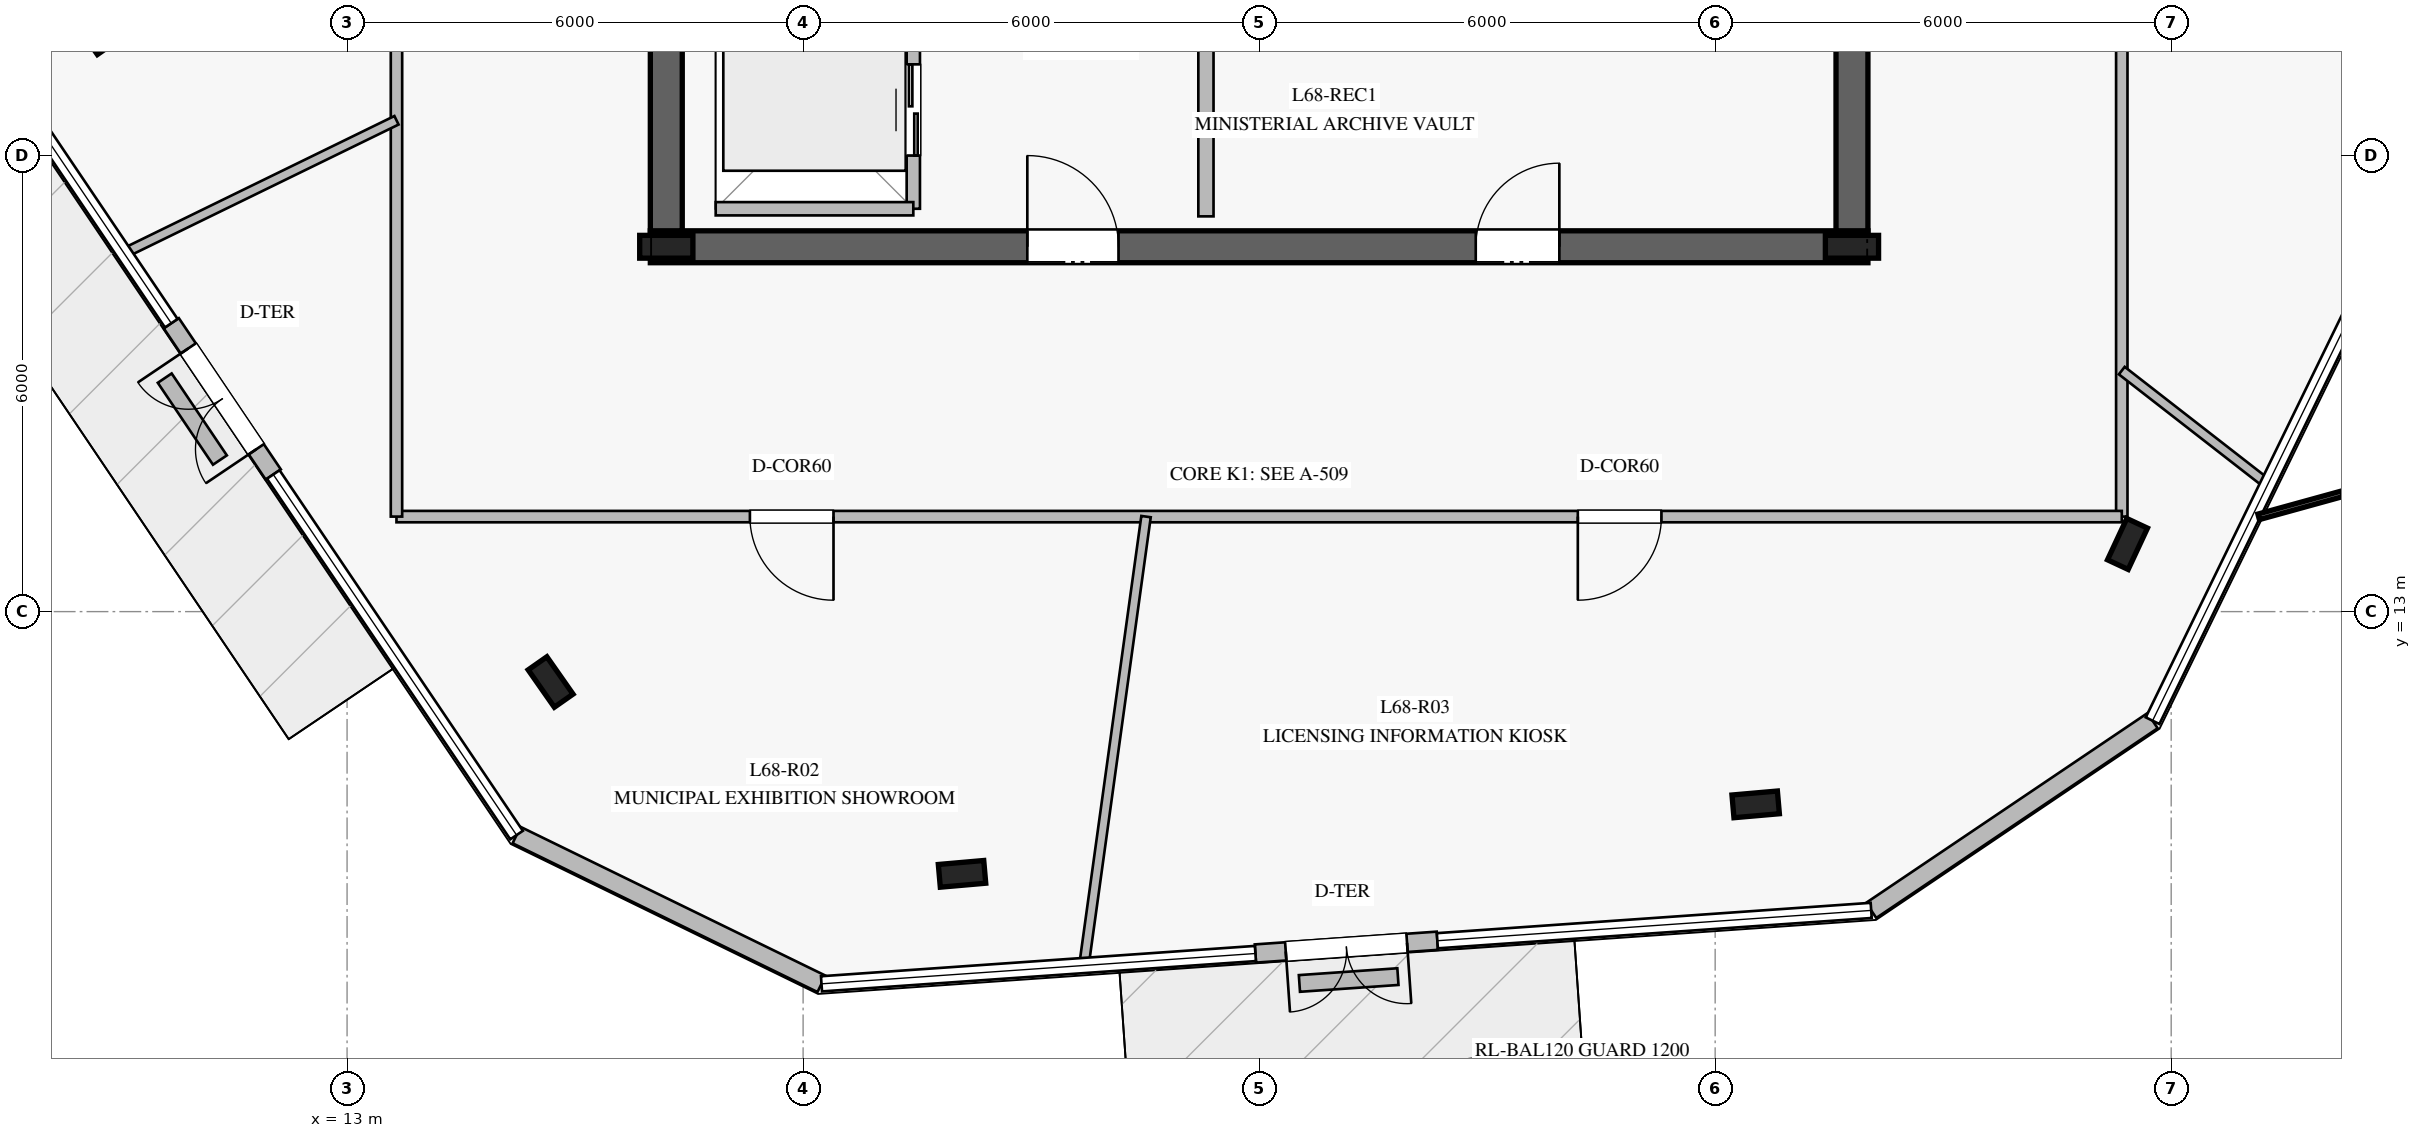
"""IFC4 building model, lengths in metres.
Left out: names, types, materials, properties, quantities, classifications, styles, units other than length and angle.
Written with IfcOpenShell. Run it as: python <this file> out.ifc"""

import sys

from ifc_helpers import new_model, si_unit, direction, frame, frame_2d, origin, origin_2d, place, context, subcontext, project, spatial, rectangle, i_section, extrude, element, fill, save


model = new_model("IFC4")
c1 = context("Model", 3, precision=1e-05, world=origin(), true_north=direction((0.0, 1.0)))
c2 = subcontext(c1, "Body", "Model", "MODEL_VIEW")
j1 = project(units=[si_unit("LENGTHUNIT", "METRE"), si_unit("PLANEANGLEUNIT", "RADIAN")], contexts=[c1])
p1 = place(None, origin())
s1 = spatial("IfcSite", under=j1, at=p1, CompositionType="ELEMENT")
p2 = place(p1, origin())
s2 = spatial("IfcBuilding", under=s1, at=p2, CompositionType="ELEMENT")
p3 = place(p2, frame((0.0, 0.0, 282.2)))
s3 = spatial("IfcBuildingStorey", under=s2, at=p3, CompositionType="ELEMENT", Elevation=282.2)
p4 = place(p3, frame((16.99, 17.8, 0.0), z_axis=(0.0, 0.0, 1.0), x_axis=(1.0, 0.0, 0.0)))
e1 = element("IfcWall", 1, at=p4, inside=s3, PredefinedType="SHEAR", context=c2, shape_type="SweptSolid", body=[
    extrude(rectangle(XDim=16.02, YDim=0.42, at=frame_2d((8.01, 0.0))), origin(), (0.0, 0.0, 1.0), 3.78),
])
p5 = place(p4, frame((4.96, 0.0, 0.0)))
e2 = element("IfcOpeningElement", 2, at=p5, cuts=e1, PredefinedType="OPENING", context=c2, shape_type="SweptSolid", body=[
    extrude(rectangle(XDim=1.2, YDim=2.25, at=frame_2d((0.6, 1.125))), frame((0.0, 0.22, 0.0), z_axis=(0.0, -1.0, 0.0), x_axis=(1.0, 0.0, 0.0)), (0.0, 0.0, 1.0), 0.44),
])
p6 = place(p4, frame((10.86, 0.0, 0.0)))
e3 = element("IfcOpeningElement", 3, at=p6, cuts=e1, PredefinedType="OPENING", context=c2, shape_type="SweptSolid", body=[
    extrude(rectangle(XDim=1.1, YDim=2.2, at=frame_2d((0.55, 1.1))), frame((0.0, 0.22, 0.0), z_axis=(0.0, -1.0, 0.0), x_axis=(1.0, 0.0, 0.0)), (0.0, 0.0, 1.0), 0.44),
])
p7 = place(p3, frame((17.2, 31.99, 0.0), z_axis=(0.0, 0.0, 1.0), x_axis=(0.0, -1.0, 0.0)))
e4 = element("IfcWall", 4, at=p7, inside=s3, PredefinedType="SHEAR", context=c2, shape_type="SweptSolid", body=[
    extrude(rectangle(XDim=13.98, YDim=0.42, at=frame_2d((6.99, 0.0))), origin(), (0.0, 0.0, 1.0), 3.78),
])
p8 = place(p7, frame((2.14, 0.0, 0.0)))
e5 = element("IfcOpeningElement", 5, at=p8, cuts=e4, PredefinedType="OPENING", context=c2, shape_type="SweptSolid", body=[
    extrude(rectangle(XDim=1.5, YDim=2.2, at=frame_2d((0.75, 1.1))), frame((0.0, 0.22, 0.0), z_axis=(0.0, -1.0, 0.0), x_axis=(1.0, 0.0, 0.0)), (0.0, 0.0, 1.0), 0.44),
])
p9 = place(p3, frame((32.8, 18.01, 0.0), z_axis=(0.0, 0.0, 1.0), x_axis=(0.0, 1.0, 0.0)))
e6 = element("IfcWall", 6, at=p9, inside=s3, PredefinedType="SHEAR", context=c2, shape_type="SweptSolid", body=[
    extrude(rectangle(XDim=13.98, YDim=0.42, at=frame_2d((6.99, 0.0))), origin(), (0.0, 0.0, 1.0), 3.78),
])
for number, where, z_axis, x_axis in (
    (7, (17.2, 17.8, 0.0), (0.0, 0.0, 1.0), (1.0, 0.0, 0.0)),
    (8, (32.8, 17.8, 0.0), (0.0, 0.0, 1.0), (1.0, 0.0, 0.0)),
):
    element("IfcColumn", number, at=place(p3, frame(where, z_axis=z_axis, x_axis=x_axis)), inside=s3, PredefinedType="COLUMN", context=c2, shape_type="SweptSolid", body=[
        extrude(i_section(OverallWidth=0.3, OverallDepth=0.7, WebThickness=0.017, FlangeThickness=0.032, at=origin_2d()), origin(), (0.0, 0.0, 1.0), 4.0),
    ])
for number, where, z_axis, x_axis in (
    (9, (15.678, 12.074, 0.0), (0.0, 0.0, 1.0), (-0.574, 0.819, 0.0)),
    (10, (21.091, 9.55, 0.0), (0.0, 0.0, 1.0), (0.996, 0.087, 0.0)),
    (11, (31.533, 10.464, 0.0), (0.0, 0.0, 1.0), (0.996, 0.087, 0.0)),
    (12, (36.425, 13.89, 0.0), (0.0, 0.0, 1.0), (0.423, 0.906, 0.0)),
):
    element("IfcColumn", number, at=place(p3, frame(where, z_axis=z_axis, x_axis=x_axis)), inside=s3, PredefinedType="COLUMN", context=c2, shape_type="SweptSolid", body=[
        extrude(i_section(OverallWidth=0.3, OverallDepth=0.6, WebThickness=0.015, FlangeThickness=0.03, at=origin_2d()), origin(), (0.0, 0.0, 1.0), 4.0),
    ])
p10 = place(p3, frame((10.687, 16.794, 0.0), z_axis=(0.0, 0.0, 1.0), x_axis=(0.559128660759, -0.82908090119, 0.0)))
e13 = element("IfcWall", 13, at=p10, inside=s3, PredefinedType="STANDARD", context=c2, shape_type="SweptSolid", body=[
    extrude(rectangle(XDim=2.4, YDim=0.24, at=frame_2d((1.2, 0.0))), origin(), (0.0, 0.0, 1.0), 3.78),
])
p11 = place(p10, frame((0.4, 0.0, 0.0)))
e14 = element("IfcOpeningElement", 14, at=p11, cuts=e13, PredefinedType="OPENING", context=c2, shape_type="SweptSolid", body=[
    extrude(rectangle(XDim=1.6, YDim=2.25, at=frame_2d((0.8, 1.125))), frame((0.0, 0.13, 0.0), z_axis=(0.0, -1.0, 0.0), x_axis=(1.0, 0.0, 0.0)), (0.0, 0.0, 1.0), 0.26),
])
p12 = place(p3, frame((15.23, 10.06, 0.0), z_axis=(0.0, 0.0, 1.0), x_axis=(0.898770548201, -0.438419321754, 0.0)))
e15 = element("IfcWall", 15, at=p12, inside=s3, PredefinedType="STANDARD", context=c2, shape_type="SweptSolid", body=[
    extrude(rectangle(XDim=4.464, YDim=0.24, at=frame_2d((2.232, 0.0))), origin(), (0.0, 0.0, 1.0), 3.78),
])
p13 = place(p3, frame((24.951, 8.502, 0.0), z_axis=(0.0, 0.0, 1.0), x_axis=(0.99754775803, 0.069989073784, 0.0)))
e16 = element("IfcWall", 16, at=p13, inside=s3, PredefinedType="STANDARD", context=c2, shape_type="SweptSolid", body=[
    extrude(rectangle(XDim=2.4, YDim=0.24, at=frame_2d((1.2, 0.0))), origin(), (0.0, 0.0, 1.0), 3.78),
])
p14 = place(p13, frame((0.4, 0.0, 0.0)))
e17 = element("IfcOpeningElement", 17, at=p14, cuts=e16, PredefinedType="OPENING", context=c2, shape_type="SweptSolid", body=[
    extrude(rectangle(XDim=1.6, YDim=2.25, at=frame_2d((0.8, 1.125))), frame((0.0, 0.13, 0.0), z_axis=(0.0, -1.0, 0.0), x_axis=(1.0, 0.0, 0.0)), (0.0, 0.0, 1.0), 0.26),
])
p15 = place(p3, frame((33.053, 9.069, 0.0), z_axis=(0.0, 0.0, 1.0), x_axis=(0.829153473241, 0.559021035214, 0.0)))
e18 = element("IfcWall", 18, at=p15, inside=s3, PredefinedType="STANDARD", context=c2, shape_type="SweptSolid", body=[
    extrude(rectangle(XDim=4.465, YDim=0.24, at=frame_2d((2.232, 0.0))), origin(), (0.0, 0.0, 1.0), 3.78),
])
p16 = place(p3, frame((25.53, 8.108, 0.0), z_axis=(0.0, 0.0, 1.0), x_axis=(0.997592367101, 0.069350335995, 0.0)))
e19 = element("IfcWall", 19, at=p16, inside=s3, PredefinedType="USERDEFINED", context=c2, shape_type="SweptSolid", body=[
    extrude(rectangle(XDim=1.299, YDim=0.22, at=frame_2d((0.649, 0.0))), origin(), (0.0, 0.0, 1.0), 0.4),
])
p17 = place(p3, frame((10.601, 16.072, 0.0), z_axis=(0.0, 0.0, 1.0), x_axis=(0.558465865857, -0.829527502059, 0.0)))
e20 = element("IfcWall", 20, at=p17, inside=s3, PredefinedType="USERDEFINED", context=c2, shape_type="SweptSolid", body=[
    extrude(rectangle(XDim=1.3, YDim=0.22, at=frame_2d((0.65, 0.0))), origin(), (0.0, 0.0, 1.0), 0.4),
])
p18 = place(p3, frame((24.3, 18.2, 0.0), z_axis=(0.0, 0.0, 1.0), x_axis=(0.0, 1.0, 0.0)))
e21 = element("IfcWall", 21, at=p18, inside=s3, PredefinedType="PARTITIONING", context=c2, shape_type="SweptSolid", body=[
    extrude(rectangle(XDim=5.15, YDim=0.2, at=frame_2d((2.575, 0.0))), origin(), (0.0, 0.0, 1.0), 3.78),
])
p19 = place(p3, frame((20.45, 18.3, 0.0), z_axis=(0.0, 0.0, 1.0), x_axis=(0.0, 1.0, 0.0)))
e22 = element("IfcWall", 22, at=p19, inside=s3, PredefinedType="PARTITIONING", context=c2, shape_type="SweptSolid", body=[
    extrude(rectangle(XDim=2.6, YDim=0.175, at=frame_2d((1.3, 0.0))), origin(), (0.0, 0.0, 1.0), 3.78),
])
p20 = place(p19, frame((0.7, 0.0, 0.0)))
e23 = element("IfcOpeningElement", 23, at=p20, cuts=e22, PredefinedType="OPENING", context=c2, shape_type="SweptSolid", body=[
    extrude(rectangle(XDim=1.2, YDim=2.2, at=frame_2d((0.6, 1.1))), frame((0.0, 0.098, 0.0), z_axis=(0.0, -1.0, 0.0), x_axis=(1.0, 0.0, 0.0)), (0.0, 0.0, 1.0), 0.195),
])
p21 = place(p3, frame((17.85, 18.3, 0.0), z_axis=(0.0, 0.0, 1.0), x_axis=(1.0, 0.0, 0.0)))
e24 = element("IfcWall", 24, at=p21, inside=s3, PredefinedType="PARTITIONING", context=c2, shape_type="SweptSolid", body=[
    extrude(rectangle(XDim=2.6, YDim=0.175, at=frame_2d((1.3, 0.0))), origin(), (0.0, 0.0, 1.0), 3.78),
])
p22 = place(p3, frame((36.35, 35.75, 0.0), z_axis=(0.0, 0.0, 1.0), x_axis=(0.0, -1.0, 0.0)))
e25 = element("IfcWall", 25, at=p22, inside=s3, PredefinedType="PARTITIONING", context=c2, shape_type="SweptSolid", body=[
    extrude(rectangle(XDim=21.5, YDim=0.15, at=frame_2d((10.75, 0.0))), origin(), (0.0, 0.0, 1.0), 3.05),
])
p23 = place(p22, frame((13.43, 0.0, 0.0)))
e26 = element("IfcOpeningElement", 26, at=p23, cuts=e25, PredefinedType="OPENING", context=c2, shape_type="SweptSolid", body=[
    extrude(rectangle(XDim=1.1, YDim=2.2, at=frame_2d((0.55, 1.1))), frame((0.0, 0.085, 0.0), z_axis=(0.0, -1.0, 0.0), x_axis=(1.0, 0.0, 0.0)), (0.0, 0.0, 1.0), 0.17),
])
p24 = place(p3, frame((36.35, 14.25, 0.0), z_axis=(0.0, 0.0, 1.0), x_axis=(-1.0, 0.0, 0.0)))
e27 = element("IfcWall", 27, at=p24, inside=s3, PredefinedType="PARTITIONING", context=c2, shape_type="SweptSolid", body=[
    extrude(rectangle(XDim=22.7, YDim=0.15, at=frame_2d((11.35, 0.0))), origin(), (0.0, 0.0, 1.0), 3.28),
])
p25 = place(p24, frame((16.95, 0.0, 0.0)))
e28 = element("IfcOpeningElement", 28, at=p25, cuts=e27, PredefinedType="OPENING", context=c2, shape_type="SweptSolid", body=[
    extrude(rectangle(XDim=1.1, YDim=2.2, at=frame_2d((0.55, 1.1))), frame((0.0, 0.085, 0.0), z_axis=(0.0, -1.0, 0.0), x_axis=(1.0, 0.0, 0.0)), (0.0, 0.0, 1.0), 0.17),
])
p26 = place(p24, frame((6.057, 0.0, 0.0)))
e29 = element("IfcOpeningElement", 29, at=p26, cuts=e27, PredefinedType="OPENING", context=c2, shape_type="SweptSolid", body=[
    extrude(rectangle(XDim=1.1, YDim=2.2, at=frame_2d((0.55, 1.1))), frame((0.0, 0.085, 0.0), z_axis=(0.0, -1.0, 0.0), x_axis=(1.0, 0.0, 0.0)), (0.0, 0.0, 1.0), 0.17),
])
p27 = place(p3, frame((13.65, 14.25, 0.0), z_axis=(0.0, 0.0, 1.0), x_axis=(0.0, 1.0, 0.0)))
e30 = element("IfcWall", 30, at=p27, inside=s3, PredefinedType="PARTITIONING", context=c2, shape_type="SweptSolid", body=[
    extrude(rectangle(XDim=21.5, YDim=0.15, at=frame_2d((10.75, 0.0))), origin(), (0.0, 0.0, 1.0), 3.05),
])
p28 = place(p27, frame((10.111, 0.0, 0.0)))
e31 = element("IfcOpeningElement", 31, at=p28, cuts=e30, PredefinedType="OPENING", context=c2, shape_type="SweptSolid", body=[
    extrude(rectangle(XDim=1.1, YDim=2.2, at=frame_2d((0.55, 1.1))), frame((0.0, 0.085, 0.0), z_axis=(0.0, -1.0, 0.0), x_axis=(1.0, 0.0, 0.0)), (0.0, 0.0, 1.0), 0.17),
])
p29 = place(p3, frame((13.65, 19.464, 0.0), z_axis=(0.0, 0.0, 1.0), x_axis=(-0.898688096622, -0.438588309226, 0.0)))
e32 = element("IfcWall", 32, at=p29, inside=s3, PredefinedType="PARTITIONING", context=c2, shape_type="SweptSolid", body=[
    extrude(rectangle(XDim=3.972, YDim=0.125, at=frame_2d((1.986, 0.0))), origin(), (0.0, 0.0, 1.0), 3.28),
])
p30 = place(p3, frame((23.512, 14.25, 0.0), z_axis=(0.0, 0.0, 1.0), x_axis=(-0.137056988253, -0.990563164049, 0.0)))
e33 = element("IfcWall", 33, at=p30, inside=s3, PredefinedType="PARTITIONING", context=c2, shape_type="SweptSolid", body=[
    extrude(rectangle(XDim=5.946, YDim=0.125, at=frame_2d((2.973, 0.0))), origin(), (0.0, 0.0, 1.0), 3.28),
])
p31 = place(p3, frame((36.35, 16.171, 0.0), z_axis=(0.0, 0.0, 1.0), x_axis=(0.78932503786, -0.613975557011, 0.0)))
e34 = element("IfcWall", 34, at=p31, inside=s3, PredefinedType="PARTITIONING", context=c2, shape_type="SweptSolid", body=[
    extrude(rectangle(XDim=2.418, YDim=0.125, at=frame_2d((1.209, 0.0))), origin(), (0.0, 0.0, 1.0), 3.28),
])
p32 = place(p11, frame((1.6, 0.0, 0.0), z_axis=(0.0, 0.0, 1.0), x_axis=(-1.0, 0.0, 0.0)))
e35 = element("IfcDoor", 35, at=p32, inside=s3, OperationType="DOUBLE_DOOR_SINGLE_SWING", PredefinedType="DOOR", context=c2, shape_type="SweptSolid", body=[
    extrude(rectangle(XDim=1.6, YDim=2.25, at=frame_2d((0.8, 1.125))), frame((0.0, 0.025, 0.0), z_axis=(0.0, -1.0, 0.0), x_axis=(1.0, 0.0, 0.0)), (0.0, 0.0, 1.0), 0.05),
])
fill(e14, e35)
p33 = place(p14, frame((1.6, 0.0, 0.0), z_axis=(0.0, 0.0, 1.0), x_axis=(-1.0, 0.0, 0.0)))
e36 = element("IfcDoor", 36, at=p33, inside=s3, OperationType="DOUBLE_DOOR_SINGLE_SWING", PredefinedType="DOOR", context=c2, shape_type="SweptSolid", body=[
    extrude(rectangle(XDim=1.6, YDim=2.25, at=frame_2d((0.8, 1.125))), frame((0.0, 0.025, 0.0), z_axis=(0.0, -1.0, 0.0), x_axis=(1.0, 0.0, 0.0)), (0.0, 0.0, 1.0), 0.05),
])
fill(e17, e36)
p34 = place(p5, origin())
e37 = element("IfcDoor", 37, at=p34, inside=s3, OperationType="SINGLE_SWING_LEFT", PredefinedType="DOOR", context=c2, shape_type="SweptSolid", body=[
    extrude(rectangle(XDim=1.2, YDim=2.25, at=frame_2d((0.6, 1.125))), frame((0.0, 0.025, 0.0), z_axis=(0.0, -1.0, 0.0), x_axis=(1.0, 0.0, 0.0)), (0.0, 0.0, 1.0), 0.05),
])
fill(e2, e37)
p35 = place(p6, origin())
e38 = element("IfcDoor", 38, at=p35, inside=s3, OperationType="SINGLE_SWING_RIGHT", PredefinedType="DOOR", context=c2, shape_type="SweptSolid", body=[
    extrude(rectangle(XDim=1.1, YDim=2.2, at=frame_2d((0.55, 1.1))), frame((0.0, 0.025, 0.0), z_axis=(0.0, -1.0, 0.0), x_axis=(1.0, 0.0, 0.0)), (0.0, 0.0, 1.0), 0.05),
])
fill(e3, e38)
p36 = place(p20, origin())
e39 = element("IfcDoor", 39, at=p36, inside=s3, OperationType="DOUBLE_DOOR_SLIDING", PredefinedType="DOOR", context=c2, shape_type="SweptSolid", body=[
    extrude(rectangle(XDim=1.2, YDim=2.2, at=frame_2d((0.6, 1.1))), frame((0.0, 0.025, 0.0), z_axis=(0.0, -1.0, 0.0), x_axis=(1.0, 0.0, 0.0)), (0.0, 0.0, 1.0), 0.05),
])
fill(e23, e39)
p37 = place(p25, origin())
e40 = element("IfcDoor", 40, at=p37, inside=s3, OperationType="SINGLE_SWING_LEFT", PredefinedType="DOOR", context=c2, shape_type="SweptSolid", body=[
    extrude(rectangle(XDim=1.1, YDim=2.2, at=frame_2d((0.55, 1.1))), frame((0.0, 0.025, 0.0), z_axis=(0.0, -1.0, 0.0), x_axis=(1.0, 0.0, 0.0)), (0.0, 0.0, 1.0), 0.05),
])
fill(e28, e40)
p38 = place(p26, origin())
e41 = element("IfcDoor", 41, at=p38, inside=s3, OperationType="SINGLE_SWING_RIGHT", PredefinedType="DOOR", context=c2, shape_type="SweptSolid", body=[
    extrude(rectangle(XDim=1.1, YDim=2.2, at=frame_2d((0.55, 1.1))), frame((0.0, 0.025, 0.0), z_axis=(0.0, -1.0, 0.0), x_axis=(1.0, 0.0, 0.0)), (0.0, 0.0, 1.0), 0.05),
])
fill(e29, e41)
save(model, sys.argv[1])
